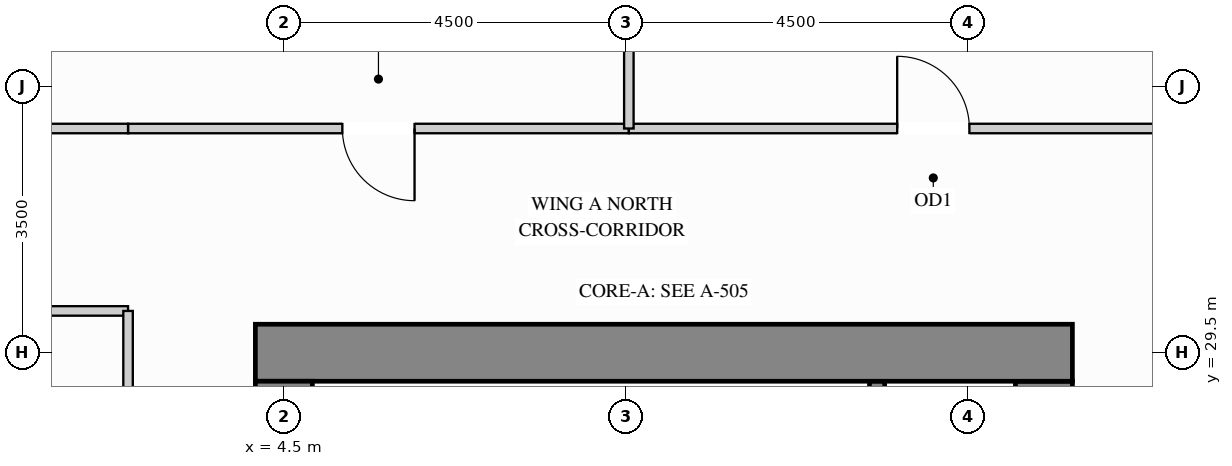
"""IFC4 building model, lengths in metres.
Left out: names, types, materials, properties, quantities, classifications, styles, units other than length and angle.
Written with IfcOpenShell. Run it as: python <this file> out.ifc"""

import sys

from ifc_helpers import new_model, si_unit, direction, frame, frame_2d, origin, place, context, subcontext, project, spatial, rectangle, extrude, source, transform, mapped, element, fill, save


model = new_model("IFC4")
c1 = context("Model", 3, precision=1e-05, world=origin(), true_north=direction((0.0, 1.0)))
c2 = subcontext(c1, "Body", "Model", "MODEL_VIEW")
j1 = project(units=[si_unit("LENGTHUNIT", "METRE"), si_unit("PLANEANGLEUNIT", "RADIAN")], contexts=[c1])
p1 = place(None, origin())
s1 = spatial("IfcSite", under=j1, at=p1, CompositionType="ELEMENT")
p2 = place(p1, origin())
s2 = spatial("IfcBuilding", under=s1, at=p2, CompositionType="ELEMENT")
p3 = place(p2, frame((0.0, 0.0, 81.0)))
s3 = spatial("IfcBuildingStorey", under=s2, at=p3, CompositionType="ELEMENT", Elevation=81.0)
m1 = source(origin(), c2, "Body", "SweptSolid", [
    extrude(rectangle(XDim=8.245, YDim=0.75, at=frame_2d((4.123, 0.0))), origin(), (0.0, 0.0, 1.0), 3.38),
])
p4 = place(p3, frame((14.5, 20.88, 0.0), z_axis=(0.0, 0.0, 1.0), x_axis=(0.0, 1.0, 0.0)))
e1 = element("IfcWall", 1, at=p4, inside=s3, PredefinedType="SHEAR", context=c2, shape_type="MappedRepresentation", body=[
    mapped(m1, transform((0.0, 0.0, 0.0), x_axis=(1.0, 0.0, 0.0), y_axis=(0.0, 1.0, 0.0), z_axis=(0.0, 0.0, 1.0))),
])
m2 = source(origin(), c2, "Body", "SweptSolid", [
    extrude(rectangle(XDim=10.75, YDim=0.75, at=frame_2d((5.375, 0.0))), origin(), (0.0, 0.0, 1.0), 3.38),
])
p5 = place(p3, frame((4.125, 29.5, 0.0), z_axis=(0.0, 0.0, 1.0), x_axis=(1.0, 0.0, 0.0)))
e2 = element("IfcWall", 2, at=p5, inside=s3, PredefinedType="SHEAR", context=c2, shape_type="MappedRepresentation", body=[
    mapped(m2, transform((0.0, 0.0, 0.0), x_axis=(1.0, 0.0, 0.0), y_axis=(0.0, 1.0, 0.0), z_axis=(0.0, 0.0, 1.0))),
])
m3 = source(origin(), c2, "Body", "SweptSolid", [
    extrude(rectangle(XDim=20.25, YDim=0.75, at=frame_2d((10.125, 0.0))), origin(), (0.0, 0.0, 1.0), 3.38),
])
p6 = place(p3, frame((4.5, 8.875, 0.0), z_axis=(0.0, 0.0, 1.0), x_axis=(0.0, 1.0, 0.0)))
e3 = element("IfcWall", 3, at=p6, inside=s3, PredefinedType="SHEAR", context=c2, shape_type="MappedRepresentation", body=[
    mapped(m3, transform((0.0, 0.0, 0.0), x_axis=(1.0, 0.0, 0.0), y_axis=(0.0, 1.0, 0.0), z_axis=(0.0, 0.0, 1.0))),
])
p7 = place(p3, frame((2.45, 32.45, 0.0), z_axis=(0.0, 0.0, 1.0), x_axis=(1.0, 0.0, 0.0)))
e4 = element("IfcWall", 4, at=p7, inside=s3, PredefinedType="PARTITIONING", context=c2, shape_type="SweptSolid", body=[
    extrude(rectangle(XDim=6.589, YDim=0.125, at=frame_2d((3.294, 0.0))), origin(), (0.0, 0.0, 1.0), 3.365),
])
p8 = place(p7, frame((2.82, 0.0, 0.0)))
e5 = element("IfcOpeningElement", 5, at=p8, cuts=e4, PredefinedType="OPENING", context=c2, shape_type="SweptSolid", body=[
    extrude(rectangle(XDim=0.95, YDim=2.15, at=frame_2d((0.475, 1.075))), frame((0.0, 0.073, 0.0), z_axis=(0.0, -1.0, 0.0), x_axis=(1.0, 0.0, 0.0)), (0.0, 0.0, 1.0), 0.145),
])
p9 = place(p3, frame((9.039, 32.45, 0.0), z_axis=(0.0, 0.0, 1.0), x_axis=(1.0, 0.0, 0.0)))
e6 = element("IfcWall", 6, at=p9, inside=s3, PredefinedType="PARTITIONING", context=c2, shape_type="SweptSolid", body=[
    extrude(rectangle(XDim=8.011, YDim=0.125, at=frame_2d((4.005, 0.0))), origin(), (0.0, 0.0, 1.0), 3.365),
])
p10 = place(p9, frame((3.531, 0.0, 0.0)))
e7 = element("IfcOpeningElement", 7, at=p10, cuts=e6, PredefinedType="OPENING", context=c2, shape_type="SweptSolid", body=[
    extrude(rectangle(XDim=0.95, YDim=2.15, at=frame_2d((0.475, 1.075))), frame((0.0, 0.073, 0.0), z_axis=(0.0, -1.0, 0.0), x_axis=(1.0, 0.0, 0.0)), (0.0, 0.0, 1.0), 0.145),
])
m4 = source(origin(), c2, "Body", "SweptSolid", [
    extrude(rectangle(XDim=2.098, YDim=0.125, at=frame_2d((1.049, 0.0))), origin(), (0.0, 0.0, 1.0), 3.365),
])
p11 = place(p3, frame((0.352, 32.45, 0.0), z_axis=(0.0, 0.0, 1.0), x_axis=(1.0, 0.0, 0.0)))
e8 = element("IfcWall", 8, at=p11, inside=s3, PredefinedType="PARTITIONING", context=c2, shape_type="MappedRepresentation", body=[
    mapped(m4, transform((0.0, 0.0, 0.0), x_axis=(1.0, 0.0, 0.0), y_axis=(0.0, 1.0, 0.0), z_axis=(0.0, 0.0, 1.0))),
])
m5 = source(origin(), c2, "Body", "SweptSolid", [
    extrude(rectangle(XDim=4.86, YDim=0.125, at=frame_2d((2.43, 0.0))), origin(), (0.0, 0.0, 1.0), 3.365),
])
p12 = place(p3, frame((9.039, 32.45, 0.0), z_axis=(0.0, 0.0, 1.0), x_axis=(0.0, 1.0, 0.0)))
e9 = element("IfcWall", 9, at=p12, inside=s3, PredefinedType="PARTITIONING", context=c2, shape_type="MappedRepresentation", body=[
    mapped(m5, transform((0.0, 0.0, 0.0), x_axis=(1.0, 0.0, 0.0), y_axis=(0.0, 1.0, 0.0), z_axis=(0.0, 0.0, 1.0))),
])
m6 = source(origin(), c2, "Body", "SweptSolid", [
    extrude(rectangle(XDim=1.26, YDim=0.125, at=frame_2d((0.63, 0.0))), origin(), (0.0, 0.0, 1.0), 3.365),
])
p13 = place(p3, frame((1.19, 30.05, 0.0), z_axis=(0.0, 0.0, 1.0), x_axis=(1.0, 0.0, 0.0)))
e10 = element("IfcWall", 10, at=p13, inside=s3, PredefinedType="PARTITIONING", context=c2, shape_type="MappedRepresentation", body=[
    mapped(m6, transform((0.0, 0.0, 0.0), x_axis=(1.0, 0.0, 0.0), y_axis=(0.0, 1.0, 0.0), z_axis=(0.0, 0.0, 1.0))),
])
p14 = place(p3, frame((2.45, 22.6, 0.0), z_axis=(0.0, 0.0, 1.0), x_axis=(0.0, 1.0, 0.0)))
e11 = element("IfcWall", 11, at=p14, inside=s3, PredefinedType="PARTITIONING", context=c2, shape_type="SweptSolid", body=[
    extrude(rectangle(XDim=7.45, YDim=0.125, at=frame_2d((3.725, 0.0))), origin(), (0.0, 0.0, 1.0), 3.365),
])
p15 = place(p14, frame((3.25, 0.0, 0.0)))
e12 = element("IfcOpeningElement", 12, at=p15, cuts=e11, PredefinedType="OPENING", context=c2, shape_type="SweptSolid", body=[
    extrude(rectangle(XDim=0.95, YDim=2.15, at=frame_2d((0.475, 1.075))), frame((0.0, 0.073, 0.0), z_axis=(0.0, -1.0, 0.0), x_axis=(1.0, 0.0, 0.0)), (0.0, 0.0, 1.0), 0.145),
])
m7 = source(origin(), c2, "Body", "SweptSolid", [
    extrude(rectangle(XDim=3.678, YDim=0.2, at=frame_2d((1.839, 0.0))), origin(), (0.0, 0.0, 1.0), 3.38),
])
p16 = place(p3, frame((12.305, 25.445, 0.0), z_axis=(0.0, 0.0, 1.0), x_axis=(0.0, 1.0, 0.0)))
e13 = element("IfcWall", 13, at=p16, inside=s3, PredefinedType="SHEAR", context=c2, shape_type="MappedRepresentation", body=[
    mapped(m7, transform((0.0, 0.0, 0.0), x_axis=(1.0, 0.0, 0.0), y_axis=(0.0, 1.0, 0.0), z_axis=(0.0, 0.0, 1.0))),
])
m8 = source(origin(), c2, "Body", "SweptSolid", [
    extrude(rectangle(XDim=0.95, YDim=2.15, at=frame_2d((0.475, 1.075))), frame((0.0, 0.025, 0.0), z_axis=(0.0, -1.0, 0.0), x_axis=(1.0, 0.0, 0.0)), (0.0, 0.0, 1.0), 0.05),
])
p17 = place(p8, origin())
e14 = element("IfcDoor", 14, at=p17, inside=s3, OperationType="SINGLE_SWING_RIGHT", PredefinedType="DOOR", context=c2, shape_type="MappedRepresentation", body=[
    mapped(m8, transform((0.0, 0.0, 0.0), x_axis=(1.0, 0.0, 0.0), y_axis=(0.0, 1.0, 0.0), z_axis=(0.0, 0.0, 1.0))),
])
fill(e5, e14)
p18 = place(p10, origin())
e15 = element("IfcDoor", 15, at=p18, inside=s3, OperationType="SINGLE_SWING_LEFT", PredefinedType="DOOR", context=c2, shape_type="MappedRepresentation", body=[
    mapped(m8, transform((0.0, 0.0, 0.0), x_axis=(1.0, 0.0, 0.0), y_axis=(0.0, 1.0, 0.0), z_axis=(0.0, 0.0, 1.0))),
])
fill(e7, e15)
save(model, sys.argv[1])
